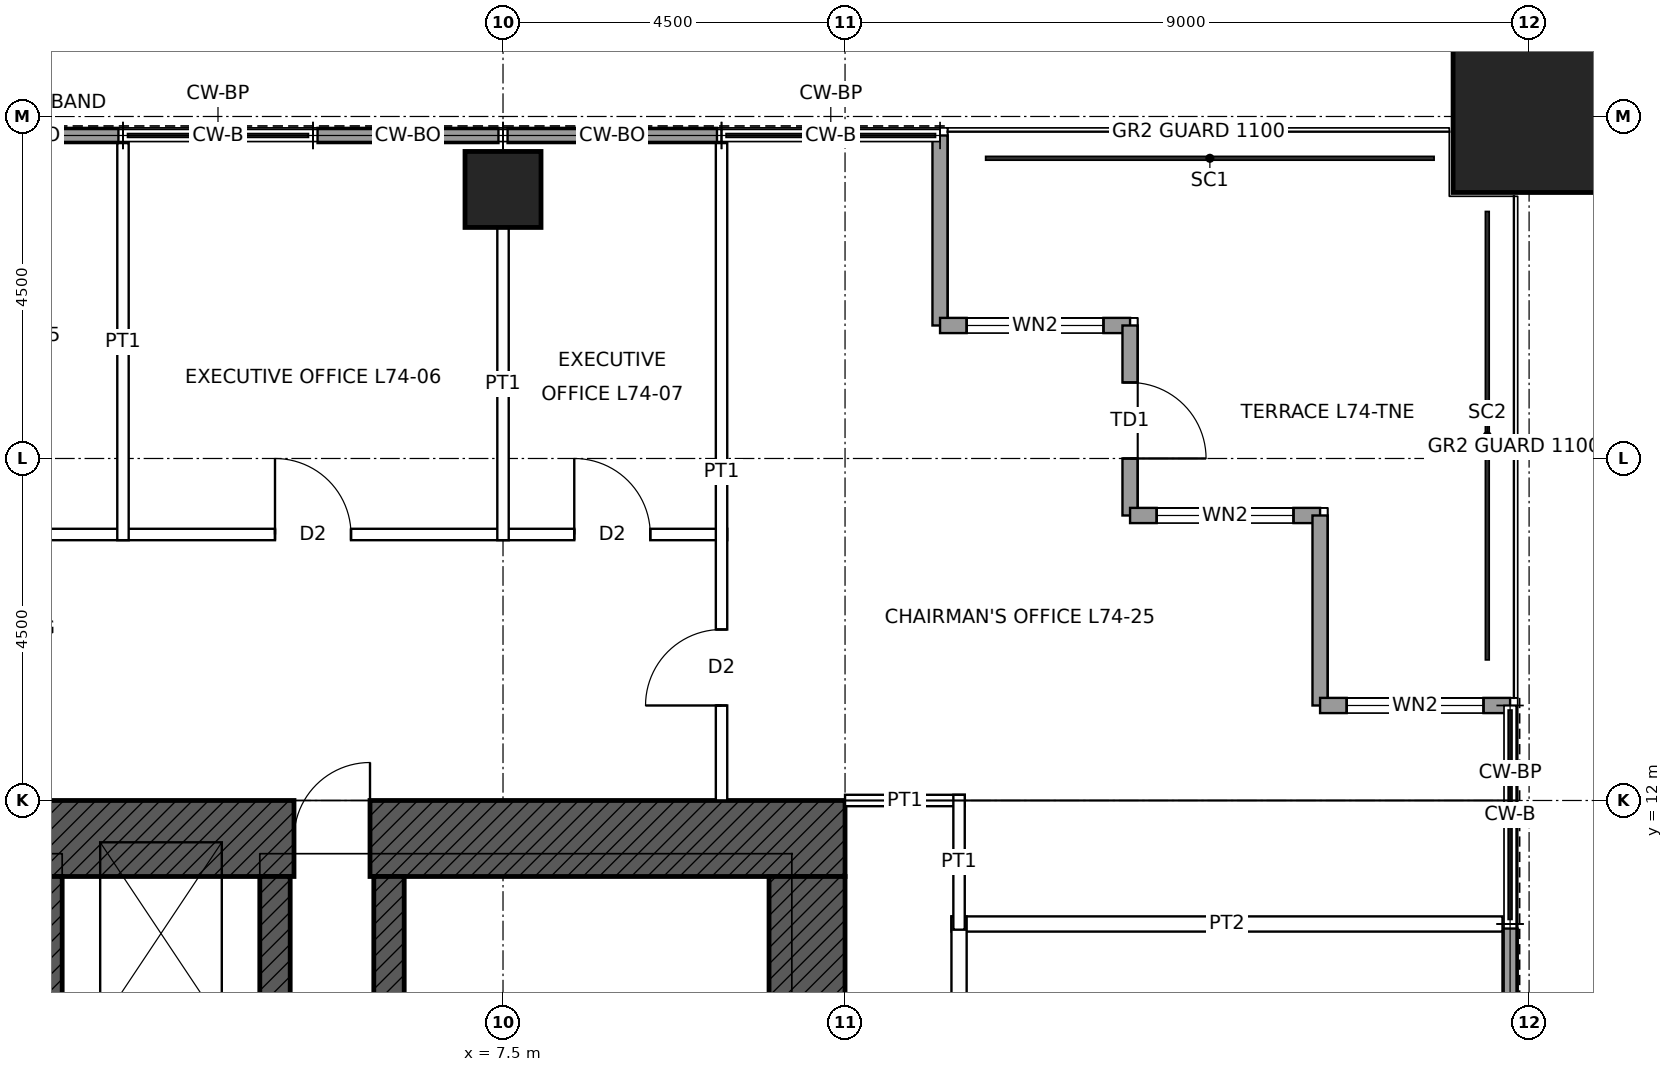
"""IFC4 building model, lengths in metres.
Left out: names, types, materials, properties, quantities, classifications, styles, units other than length and angle.
Written with IfcOpenShell. Run it as: python <this file> out.ifc"""

import sys

from ifc_helpers import new_model, si_unit, direction, frame, frame_2d, origin, origin_2d, place, context, subcontext, project, spatial, rectangle, hollow_rectangle, extrude, element, fill, save


model = new_model("IFC4")
c1 = context("Model", 3, precision=1e-05, world=origin(), true_north=direction((0.0, 1.0)))
c2 = subcontext(c1, "Body", "Model", "MODEL_VIEW")
j1 = project(units=[si_unit("LENGTHUNIT", "METRE"), si_unit("PLANEANGLEUNIT", "RADIAN")], contexts=[c1])
p1 = place(None, origin())
s1 = spatial("IfcSite", under=j1, at=p1, CompositionType="ELEMENT")
p2 = place(p1, origin())
s2 = spatial("IfcBuilding", under=s1, at=p2, CompositionType="ELEMENT")
p3 = place(p2, frame((0.0, 0.0, 331.9)))
s3 = spatial("IfcBuildingStorey", under=s2, at=p3, CompositionType="ELEMENT", Elevation=331.9)
p4 = place(p3, frame((21.0, 21.0, 0.0), z_axis=(0.0, 0.0, 1.0), x_axis=(1.0, 0.0, 0.0)))
e1 = element("IfcColumn", 1, at=p4, inside=s3, PredefinedType="COLUMN", context=c2, shape_type="SweptSolid", body=[
    extrude(hollow_rectangle(XDim=2.0, YDim=2.0, WallThickness=0.095, at=origin_2d()), origin(), (0.0, 0.0, 1.0), 4.0),
])
p5 = place(p3, frame((7.5, 20.04, 0.0), z_axis=(0.0, 0.0, 1.0), x_axis=(1.0, 0.0, 0.0)))
e2 = element("IfcColumn", 2, at=p5, inside=s3, PredefinedType="COLUMN", context=c2, shape_type="SweptSolid", body=[
    extrude(hollow_rectangle(XDim=1.0, YDim=1.0, WallThickness=0.075, at=origin_2d()), origin(), (0.0, 0.0, 1.0), 4.0),
])
p6 = place(p3, frame((-12.0, 11.5, 0.0), z_axis=(0.0, 0.0, 1.0), x_axis=(1.0, 0.0, 0.0)))
e3 = element("IfcWall", 3, at=p6, inside=s3, PredefinedType="SHEAR", context=c2, shape_type="SweptSolid", body=[
    extrude(rectangle(XDim=24.0, YDim=1.0, at=frame_2d((12.0, 0.0))), origin(), (0.0, 0.0, 1.0), 4.0),
])
p7 = place(p6, frame((6.25, 0.0, 0.0)))
e4 = element("IfcOpeningElement", 4, at=p7, cuts=e3, PredefinedType="OPENING", context=c2, shape_type="SweptSolid", body=[
    extrude(rectangle(XDim=1.0, YDim=2.4, at=frame_2d((0.5, 1.2))), frame((0.0, 0.51, 0.0), z_axis=(0.0, -1.0, 0.0), x_axis=(1.0, 0.0, 0.0)), (0.0, 0.0, 1.0), 1.02),
])
p8 = place(p6, frame((16.75, 0.0, 0.0)))
e5 = element("IfcOpeningElement", 5, at=p8, cuts=e3, PredefinedType="OPENING", context=c2, shape_type="SweptSolid", body=[
    extrude(rectangle(XDim=1.0, YDim=2.4, at=frame_2d((0.5, 1.2))), frame((0.0, 0.51, 0.0), z_axis=(0.0, -1.0, 0.0), x_axis=(1.0, 0.0, 0.0)), (0.0, 0.0, 1.0), 1.02),
])
p9 = place(p3, frame((11.5, 11.0, 0.0), z_axis=(0.0, 0.0, 1.0), x_axis=(0.0, -1.0, 0.0)))
e6 = element("IfcWall", 6, at=p9, inside=s3, PredefinedType="SHEAR", context=c2, shape_type="SweptSolid", body=[
    extrude(rectangle(XDim=22.0, YDim=1.0, at=frame_2d((11.0, 0.0))), origin(), (0.0, 0.0, 1.0), 4.0),
])
p10 = place(p9, frame((10.5, 0.0, 0.0)))
e7 = element("IfcOpeningElement", 7, at=p10, cuts=e6, PredefinedType="OPENING", context=c2, shape_type="SweptSolid", body=[
    extrude(rectangle(XDim=1.0, YDim=2.4, at=frame_2d((0.5, 1.2))), frame((0.0, 0.51, 0.0), z_axis=(0.0, -1.0, 0.0), x_axis=(1.0, 0.0, 0.0)), (0.0, 0.0, 1.0), 1.02),
])
p11 = place(p3, frame((6.0, 4.5, 0.0), z_axis=(0.0, 0.0, 1.0), x_axis=(0.0, 1.0, 0.0)))
e8 = element("IfcWall", 8, at=p11, inside=s3, PredefinedType="SHEAR", context=c2, shape_type="SweptSolid", body=[
    extrude(rectangle(XDim=6.5, YDim=0.4, at=frame_2d((3.25, 0.0))), origin(), (0.0, 0.0, 1.0), 4.0),
])
p12 = place(p11, frame((0.6, 0.0, 0.0)))
e9 = element("IfcOpeningElement", 9, at=p12, cuts=e8, PredefinedType="OPENING", context=c2, shape_type="SweptSolid", body=[
    extrude(rectangle(XDim=1.0, YDim=2.1, at=frame_2d((0.5, 1.05))), frame((0.0, 0.21, 0.0), z_axis=(0.0, -1.0, 0.0), x_axis=(1.0, 0.0, 0.0)), (0.0, 0.0, 1.0), 0.42),
])
for number, where, z_axis, x_axis in (
    (10, (4.5, 8.5, 0.0), (0.0, 0.0, 1.0), (0.0, 1.0, 0.0)),
    (11, (1.5, 8.5, 0.0), (0.0, 0.0, 1.0), (0.0, 1.0, 0.0)),
):
    element("IfcWall", number, at=place(p3, frame(where, z_axis=z_axis, x_axis=x_axis)), inside=s3, PredefinedType="SHEAR", context=c2, shape_type="SweptSolid", body=[
        extrude(rectangle(XDim=2.5, YDim=0.4, at=frame_2d((1.25, 0.0))), origin(), (0.0, 0.0, 1.0), 4.0),
    ])
p13 = place(p3, frame((13.25, 20.75, 0.0), z_axis=(0.0, 0.0, 1.0), x_axis=(0.0, -1.0, 0.0)))
e12 = element("IfcWall", 12, at=p13, inside=s3, PredefinedType="SOLIDWALL", context=c2, shape_type="SweptSolid", body=[
    extrude(rectangle(XDim=2.5, YDim=0.2, at=frame_2d((1.25, 0.0))), origin(), (0.0, 0.0, 1.0), 3.8),
])
p14 = place(p3, frame((13.25, 18.25, 0.0), z_axis=(0.0, 0.0, 1.0), x_axis=(1.0, 0.0, 0.0)))
e13 = element("IfcWall", 13, at=p14, inside=s3, PredefinedType="SOLIDWALL", context=c2, shape_type="SweptSolid", body=[
    extrude(rectangle(XDim=2.5, YDim=0.2, at=frame_2d((1.25, 0.0))), origin(), (0.0, 0.0, 1.0), 3.8),
])
p15 = place(p14, frame((0.35, 0.0, 0.3)))
e14 = element("IfcOpeningElement", 14, at=p15, cuts=e13, PredefinedType="OPENING", context=c2, shape_type="SweptSolid", body=[
    extrude(rectangle(XDim=1.8, YDim=2.4, at=frame_2d((0.9, 1.2))), frame((0.0, 0.11, 0.0), z_axis=(0.0, -1.0, 0.0), x_axis=(1.0, 0.0, 0.0)), (0.0, 0.0, 1.0), 0.22),
])
p16 = place(p3, frame((15.75, 18.25, 0.0), z_axis=(0.0, 0.0, 1.0), x_axis=(0.0, -1.0, 0.0)))
e15 = element("IfcWall", 15, at=p16, inside=s3, PredefinedType="SOLIDWALL", context=c2, shape_type="SweptSolid", body=[
    extrude(rectangle(XDim=2.5, YDim=0.2, at=frame_2d((1.25, 0.0))), origin(), (0.0, 0.0, 1.0), 2.888),
])
p17 = place(p16, frame((0.75, 0.0, 0.0)))
e16 = element("IfcOpeningElement", 16, at=p17, cuts=e15, PredefinedType="OPENING", context=c2, shape_type="SweptSolid", body=[
    extrude(rectangle(XDim=1.0, YDim=2.4, at=frame_2d((0.5, 1.2))), frame((0.0, 0.11, 0.0), z_axis=(0.0, -1.0, 0.0), x_axis=(1.0, 0.0, 0.0)), (0.0, 0.0, 1.0), 0.22),
])
p18 = place(p3, frame((15.75, 15.75, 0.0), z_axis=(0.0, 0.0, 1.0), x_axis=(1.0, 0.0, 0.0)))
e17 = element("IfcWall", 17, at=p18, inside=s3, PredefinedType="SOLIDWALL", context=c2, shape_type="SweptSolid", body=[
    extrude(rectangle(XDim=2.5, YDim=0.2, at=frame_2d((1.25, 0.0))), origin(), (0.0, 0.0, 1.0), 3.8),
])
p19 = place(p18, frame((0.35, 0.0, 0.3)))
e18 = element("IfcOpeningElement", 18, at=p19, cuts=e17, PredefinedType="OPENING", context=c2, shape_type="SweptSolid", body=[
    extrude(rectangle(XDim=1.8, YDim=2.4, at=frame_2d((0.9, 1.2))), frame((0.0, 0.11, 0.0), z_axis=(0.0, -1.0, 0.0), x_axis=(1.0, 0.0, 0.0)), (0.0, 0.0, 1.0), 0.22),
])
p20 = place(p3, frame((18.25, 15.75, 0.0), z_axis=(0.0, 0.0, 1.0), x_axis=(0.0, -1.0, 0.0)))
e19 = element("IfcWall", 19, at=p20, inside=s3, PredefinedType="SOLIDWALL", context=c2, shape_type="SweptSolid", body=[
    extrude(rectangle(XDim=2.5, YDim=0.2, at=frame_2d((1.25, 0.0))), origin(), (0.0, 0.0, 1.0), 3.8),
])
p21 = place(p3, frame((18.25, 13.25, 0.0), z_axis=(0.0, 0.0, 1.0), x_axis=(1.0, 0.0, 0.0)))
e20 = element("IfcWall", 20, at=p21, inside=s3, PredefinedType="SOLIDWALL", context=c2, shape_type="SweptSolid", body=[
    extrude(rectangle(XDim=2.5, YDim=0.2, at=frame_2d((1.25, 0.0))), origin(), (0.0, 0.0, 1.0), 3.8),
])
p22 = place(p21, frame((0.35, 0.0, 0.3)))
e21 = element("IfcOpeningElement", 21, at=p22, cuts=e20, PredefinedType="OPENING", context=c2, shape_type="SweptSolid", body=[
    extrude(rectangle(XDim=1.8, YDim=2.4, at=frame_2d((0.9, 1.2))), frame((0.0, 0.11, 0.0), z_axis=(0.0, -1.0, 0.0), x_axis=(1.0, 0.0, 0.0)), (0.0, 0.0, 1.0), 0.22),
])
for number, where, z_axis, x_axis in (
    (22, (0.06, 20.75, 0.0), (0.0, 0.0, 1.0), (1.0, 0.0, 0.0)),
    (23, (5.06, 20.75, 0.0), (0.0, 0.0, 1.0), (1.0, 0.0, 0.0)),
):
    element("IfcWall", number, at=place(p3, frame(where, z_axis=z_axis, x_axis=x_axis)), inside=s3, PredefinedType="SOLIDWALL", context=c2, shape_type="SweptSolid", body=[
        extrude(rectangle(XDim=2.38, YDim=0.2, at=frame_2d((1.19, 0.0))), origin(), (0.0, 0.0, 1.0), 3.8),
    ])
for number, where, z_axis, x_axis in (
    (24, (7.56, 20.75, 0.0), (0.0, 0.0, 1.0), (1.0, 0.0, 0.0)),
    (25, (20.75, 10.315, 0.0), (0.0, 0.0, 1.0), (0.0, -1.0, 0.0)),
):
    element("IfcWall", number, at=place(p3, frame(where, z_axis=z_axis, x_axis=x_axis)), inside=s3, PredefinedType="SOLIDWALL", context=c2, shape_type="SweptSolid", body=[
        extrude(rectangle(XDim=2.755, YDim=0.2, at=frame_2d((1.377, 0.0))), origin(), (0.0, 0.0, 1.0), 3.8),
    ])
p23 = place(p3, frame((13.4, 10.375, 0.0), z_axis=(0.0, 0.0, 1.0), x_axis=(1.0, 0.0, 0.0)))
e26 = element("IfcWall", 26, at=p23, inside=s3, PredefinedType="PARTITIONING", context=c2, shape_type="SweptSolid", body=[
    extrude(rectangle(XDim=7.25, YDim=0.2, at=frame_2d((3.625, 0.0))), origin(), (0.0, 0.0, 1.0), 3.8),
])
p24 = place(p3, frame((12.0, 12.0, 0.0), z_axis=(0.0, 0.0, 1.0), x_axis=(1.0, 0.0, 0.0)))
e27 = element("IfcWall", 27, at=p24, inside=s3, PredefinedType="PARTITIONING", context=c2, shape_type="SweptSolid", body=[
    extrude(rectangle(XDim=1.575, YDim=0.15, at=frame_2d((0.788, 0.0))), origin(), (0.0, 0.0, 1.0), 2.873),
])
p25 = place(p3, frame((-10.45, 15.5, 0.0), z_axis=(0.0, 0.0, 1.0), x_axis=(1.0, 0.0, 0.0)))
e28 = element("IfcWall", 28, at=p25, inside=s3, PredefinedType="PARTITIONING", context=c2, shape_type="SweptSolid", body=[
    extrude(rectangle(XDim=20.9, YDim=0.15, at=frame_2d((10.45, 0.0))), origin(), (0.0, 0.0, 1.0), 3.8),
])
p26 = place(p25, frame((1.012, 0.0, 0.0)))
e29 = element("IfcOpeningElement", 29, at=p26, cuts=e28, PredefinedType="OPENING", context=c2, shape_type="SweptSolid", body=[
    extrude(rectangle(XDim=1.0, YDim=2.1, at=frame_2d((0.5, 1.05))), frame((0.0, 0.085, 0.0), z_axis=(0.0, -1.0, 0.0), x_axis=(1.0, 0.0, 0.0)), (0.0, 0.0, 1.0), 0.17),
])
p27 = place(p25, frame((4.95, 0.0, 0.0)))
e30 = element("IfcOpeningElement", 30, at=p27, cuts=e28, PredefinedType="OPENING", context=c2, shape_type="SweptSolid", body=[
    extrude(rectangle(XDim=1.0, YDim=2.1, at=frame_2d((0.5, 1.05))), frame((0.0, 0.085, 0.0), z_axis=(0.0, -1.0, 0.0), x_axis=(1.0, 0.0, 0.0)), (0.0, 0.0, 1.0), 0.17),
])
p28 = place(p25, frame((9.95, 0.0, 0.0)))
e31 = element("IfcOpeningElement", 31, at=p28, cuts=e28, PredefinedType="OPENING", context=c2, shape_type="SweptSolid", body=[
    extrude(rectangle(XDim=1.0, YDim=2.1, at=frame_2d((0.5, 1.05))), frame((0.0, 0.085, 0.0), z_axis=(0.0, -1.0, 0.0), x_axis=(1.0, 0.0, 0.0)), (0.0, 0.0, 1.0), 0.17),
])
p29 = place(p25, frame((14.95, 0.0, 0.0)))
e32 = element("IfcOpeningElement", 32, at=p29, cuts=e28, PredefinedType="OPENING", context=c2, shape_type="SweptSolid", body=[
    extrude(rectangle(XDim=1.0, YDim=2.1, at=frame_2d((0.5, 1.05))), frame((0.0, 0.085, 0.0), z_axis=(0.0, -1.0, 0.0), x_axis=(1.0, 0.0, 0.0)), (0.0, 0.0, 1.0), 0.17),
])
p30 = place(p25, frame((18.887, 0.0, 0.0)))
e33 = element("IfcOpeningElement", 33, at=p30, cuts=e28, PredefinedType="OPENING", context=c2, shape_type="SweptSolid", body=[
    extrude(rectangle(XDim=1.0, YDim=2.1, at=frame_2d((0.5, 1.05))), frame((0.0, 0.085, 0.0), z_axis=(0.0, -1.0, 0.0), x_axis=(1.0, 0.0, 0.0)), (0.0, 0.0, 1.0), 0.17),
])
p31 = place(p3, frame((2.5, 15.425, 0.0), z_axis=(0.0, 0.0, 1.0), x_axis=(0.0, 1.0, 0.0)))
e34 = element("IfcWall", 34, at=p31, inside=s3, PredefinedType="PARTITIONING", context=c2, shape_type="SweptSolid", body=[
    extrude(rectangle(XDim=5.225, YDim=0.15, at=frame_2d((2.612, 0.0))), origin(), (0.0, 0.0, 1.0), 3.8),
])
p32 = place(p3, frame((7.5, 15.425, 0.0), z_axis=(0.0, 0.0, 1.0), x_axis=(0.0, 1.0, 0.0)))
e35 = element("IfcWall", 35, at=p32, inside=s3, PredefinedType="PARTITIONING", context=c2, shape_type="SweptSolid", body=[
    extrude(rectangle(XDim=4.115, YDim=0.15, at=frame_2d((2.058, 0.0))), origin(), (0.0, 0.0, 1.0), 2.769),
])
p33 = place(p3, frame((10.375, 12.0, 0.0), z_axis=(0.0, 0.0, 1.0), x_axis=(0.0, 1.0, 0.0)))
e36 = element("IfcWall", 36, at=p33, inside=s3, PredefinedType="PARTITIONING", context=c2, shape_type="SweptSolid", body=[
    extrude(rectangle(XDim=8.65, YDim=0.15, at=frame_2d((4.325, 0.0))), origin(), (0.0, 0.0, 1.0), 3.8),
])
p34 = place(p33, frame((1.25, 0.0, 0.0)))
e37 = element("IfcOpeningElement", 37, at=p34, cuts=e36, PredefinedType="OPENING", context=c2, shape_type="SweptSolid", body=[
    extrude(rectangle(XDim=1.0, YDim=2.1, at=frame_2d((0.5, 1.05))), frame((0.0, 0.085, 0.0), z_axis=(0.0, -1.0, 0.0), x_axis=(1.0, 0.0, 0.0)), (0.0, 0.0, 1.0), 0.17),
])
p35 = place(p3, frame((13.5, -0.1, 0.0), z_axis=(0.0, 0.0, 1.0), x_axis=(0.0, 1.0, 0.0)))
e38 = element("IfcWall", 38, at=p35, inside=s3, PredefinedType="PARTITIONING", context=c2, shape_type="SweptSolid", body=[
    extrude(rectangle(XDim=10.575, YDim=0.2, at=frame_2d((5.288, 0.0))), origin(), (0.0, 0.0, 1.0), 3.8),
])
p36 = place(p35, frame((7.288, 0.0, 0.0)))
e39 = element("IfcOpeningElement", 39, at=p36, cuts=e38, PredefinedType="OPENING", context=c2, shape_type="SweptSolid", body=[
    extrude(rectangle(XDim=1.0, YDim=2.4, at=frame_2d((0.5, 1.2))), frame((0.0, 0.11, 0.0), z_axis=(0.0, -1.0, 0.0), x_axis=(1.0, 0.0, 0.0)), (0.0, 0.0, 1.0), 0.22),
])
p37 = place(p35, frame((2.1, 0.0, 0.0)))
e40 = element("IfcOpeningElement", 40, at=p37, cuts=e38, PredefinedType="OPENING", context=c2, shape_type="SweptSolid", body=[
    extrude(rectangle(XDim=1.0, YDim=2.4, at=frame_2d((0.5, 1.2))), frame((0.0, 0.11, 0.0), z_axis=(0.0, -1.0, 0.0), x_axis=(1.0, 0.0, 0.0)), (0.0, 0.0, 1.0), 0.22),
])
p38 = place(p3, frame((13.5, 10.3, 0.0), z_axis=(0.0, 0.0, 1.0), x_axis=(0.0, 1.0, 0.0)))
e41 = element("IfcWall", 41, at=p38, inside=s3, PredefinedType="PARTITIONING", context=c2, shape_type="SweptSolid", body=[
    extrude(rectangle(XDim=1.775, YDim=0.15, at=frame_2d((0.887, 0.0))), origin(), (0.0, 0.0, 1.0), 3.8),
])
p39 = place(p15, origin())
e42 = element("IfcWindow", 42, at=p39, inside=s3, PartitioningType="SINGLE_PANEL", PredefinedType="WINDOW", context=c2, shape_type="SweptSolid", body=[
    extrude(rectangle(XDim=1.8, YDim=2.4, at=frame_2d((0.9, 1.2))), frame((0.0, 0.03, 0.0), z_axis=(0.0, -1.0, 0.0), x_axis=(1.0, 0.0, 0.0)), (0.0, 0.0, 1.0), 0.06),
])
fill(e14, e42)
p40 = place(p17, origin())
e43 = element("IfcDoor", 43, at=p40, inside=s3, OperationType="SINGLE_SWING_RIGHT", PredefinedType="DOOR", context=c2, shape_type="SweptSolid", body=[
    extrude(rectangle(XDim=1.0, YDim=2.4, at=frame_2d((0.5, 1.2))), frame((0.0, 0.025, 0.0), z_axis=(0.0, -1.0, 0.0), x_axis=(1.0, 0.0, 0.0)), (0.0, 0.0, 1.0), 0.05),
])
fill(e16, e43)
p41 = place(p19, origin())
e44 = element("IfcWindow", 44, at=p41, inside=s3, PartitioningType="SINGLE_PANEL", PredefinedType="WINDOW", context=c2, shape_type="SweptSolid", body=[
    extrude(rectangle(XDim=1.8, YDim=2.4, at=frame_2d((0.9, 1.2))), frame((0.0, 0.03, 0.0), z_axis=(0.0, -1.0, 0.0), x_axis=(1.0, 0.0, 0.0)), (0.0, 0.0, 1.0), 0.06),
])
fill(e18, e44)
p42 = place(p22, origin())
e45 = element("IfcWindow", 45, at=p42, inside=s3, PartitioningType="SINGLE_PANEL", PredefinedType="WINDOW", context=c2, shape_type="SweptSolid", body=[
    extrude(rectangle(XDim=1.8, YDim=2.4, at=frame_2d((0.9, 1.2))), frame((0.0, 0.03, 0.0), z_axis=(0.0, -1.0, 0.0), x_axis=(1.0, 0.0, 0.0)), (0.0, 0.0, 1.0), 0.06),
])
fill(e21, e45)
p43 = place(p8, origin())
e46 = element("IfcDoor", 46, at=p43, inside=s3, OperationType="SINGLE_SWING_RIGHT", PredefinedType="DOOR", context=c2, shape_type="SweptSolid", body=[
    extrude(rectangle(XDim=1.0, YDim=2.4, at=frame_2d((0.5, 1.2))), frame((0.0, 0.485, 0.0), z_axis=(0.0, -1.0, 0.0), x_axis=(1.0, 0.0, 0.0)), (0.0, 0.0, 1.0), 0.05),
])
fill(e5, e46)
p44 = place(p29, origin())
e47 = element("IfcDoor", 47, at=p44, inside=s3, OperationType="SINGLE_SWING_LEFT", PredefinedType="DOOR", context=c2, shape_type="SweptSolid", body=[
    extrude(rectangle(XDim=1.0, YDim=2.1, at=frame_2d((0.5, 1.05))), frame((0.0, 0.025, 0.0), z_axis=(0.0, -1.0, 0.0), x_axis=(1.0, 0.0, 0.0)), (0.0, 0.0, 1.0), 0.05),
])
fill(e32, e47)
p45 = place(p30, origin())
e48 = element("IfcDoor", 48, at=p45, inside=s3, OperationType="SINGLE_SWING_LEFT", PredefinedType="DOOR", context=c2, shape_type="SweptSolid", body=[
    extrude(rectangle(XDim=1.0, YDim=2.1, at=frame_2d((0.5, 1.05))), frame((0.0, 0.025, 0.0), z_axis=(0.0, -1.0, 0.0), x_axis=(1.0, 0.0, 0.0)), (0.0, 0.0, 1.0), 0.05),
])
fill(e33, e48)
p46 = place(p34, origin())
e49 = element("IfcDoor", 49, at=p46, inside=s3, OperationType="SINGLE_SWING_LEFT", PredefinedType="DOOR", context=c2, shape_type="SweptSolid", body=[
    extrude(rectangle(XDim=1.0, YDim=2.1, at=frame_2d((0.5, 1.05))), frame((0.0, 0.025, 0.0), z_axis=(0.0, -1.0, 0.0), x_axis=(1.0, 0.0, 0.0)), (0.0, 0.0, 1.0), 0.05),
])
fill(e37, e49)
save(model, sys.argv[1])
